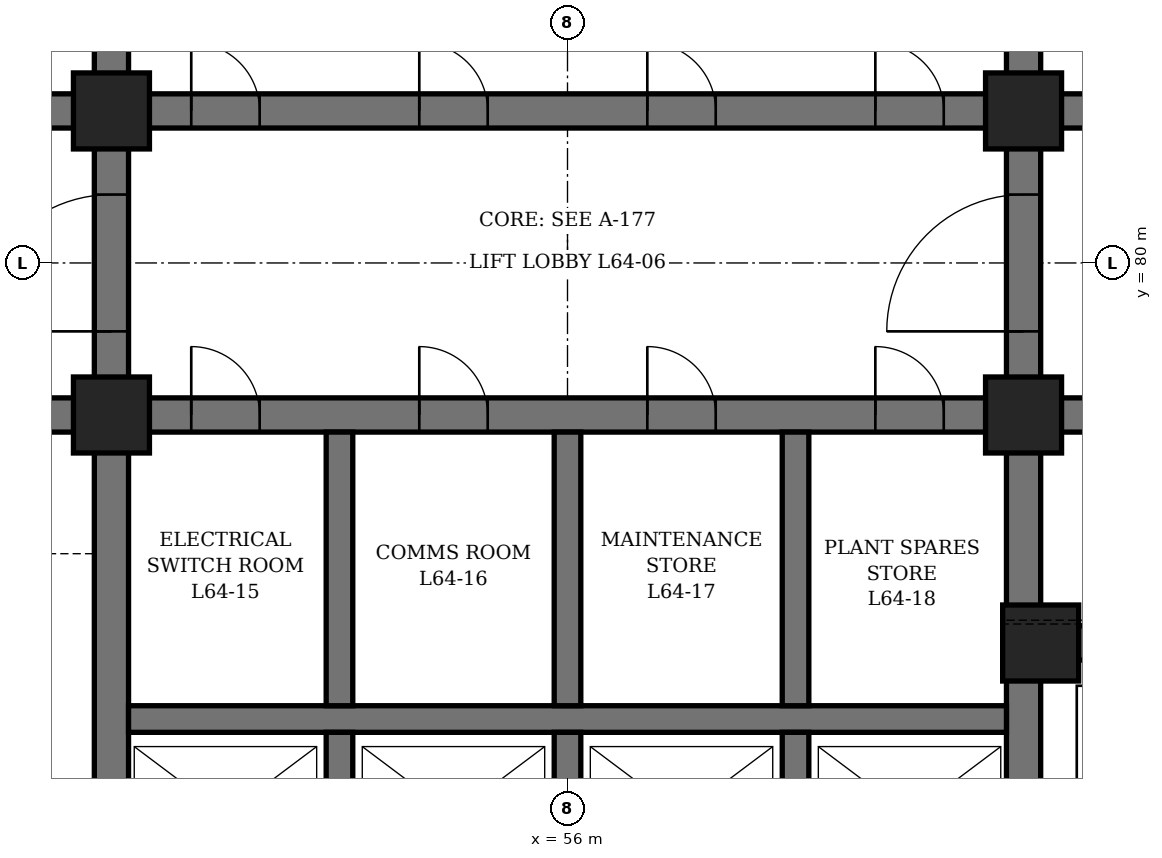
"""IFC4 building model, lengths in metres.
Left out: names, types, materials, properties, quantities, classifications, styles, units other than length and angle.
Written with IfcOpenShell. Run it as: python <this file> out.ifc"""

import sys

from ifc_helpers import new_model, si_unit, direction, frame, frame_2d, origin, origin_2d, place, context, subcontext, project, spatial, polyline, rectangle, hollow_rectangle, outline, extrude, element, fill, save


model = new_model("IFC4")
c1 = context("Model", 3, precision=1e-05, world=origin(), true_north=direction((0.0, 1.0)))
c2 = subcontext(c1, "Body", "Model", "MODEL_VIEW")
j1 = project(units=[si_unit("LENGTHUNIT", "METRE"), si_unit("PLANEANGLEUNIT", "RADIAN")], contexts=[c1])
p1 = place(None, origin())
s1 = spatial("IfcSite", under=j1, at=p1, CompositionType="ELEMENT")
p2 = place(p1, origin())
s2 = spatial("IfcBuilding", under=s1, at=p2, CompositionType="ELEMENT")
p3 = place(p2, frame((0.0, 0.0, 285.7)))
s3 = spatial("IfcBuildingStorey", under=s2, at=p3, CompositionType="ELEMENT", Elevation=285.7)
p4 = place(p3, frame((50.0, 71.6, 0.0), z_axis=(0.0, 0.0, 1.0), x_axis=(0.0, 1.0, 0.0)))
e1 = element("IfcWall", 1, at=p4, inside=s3, PredefinedType="SHEAR", context=c2, shape_type="SweptSolid", body=[
    extrude(outline(polyline([(0.0, 0.0), (16.8, 0.0), (16.8, 16.293), (0.0, 9.987), (0.0, 0.0)])), frame((0.0, 0.225, 0.0), z_axis=(0.0, -1.0, 0.0), x_axis=(1.0, 0.0, 0.0)), (0.0, 0.0, 1.0), 0.45),
])
p5 = place(p4, frame((7.5, 0.0, 0.0)))
e2 = element("IfcOpeningElement", 2, at=p5, cuts=e1, PredefinedType="OPENING", context=c2, shape_type="SweptSolid", body=[
    extrude(rectangle(XDim=1.8, YDim=2.4, at=frame_2d((0.9, 1.2))), frame((0.0, 0.235, 0.0), z_axis=(0.0, -1.0, 0.0), x_axis=(1.0, 0.0, 0.0)), (0.0, 0.0, 1.0), 0.47),
])
p6 = place(p3, frame((62.0, 71.6, 0.0), z_axis=(0.0, 0.0, 1.0), x_axis=(0.0, 1.0, 0.0)))
e3 = element("IfcWall", 3, at=p6, inside=s3, PredefinedType="SHEAR", context=c2, shape_type="SweptSolid", body=[
    extrude(outline(polyline([(0.0, 0.0), (16.8, 0.0), (16.8, 16.293), (0.0, 9.987), (0.0, 0.0)])), frame((0.0, 0.225, 0.0), z_axis=(0.0, -1.0, 0.0), x_axis=(1.0, 0.0, 0.0)), (0.0, 0.0, 1.0), 0.45),
])
p7 = place(p6, frame((7.5, 0.0, 0.0)))
e4 = element("IfcOpeningElement", 4, at=p7, cuts=e3, PredefinedType="OPENING", context=c2, shape_type="SweptSolid", body=[
    extrude(rectangle(XDim=1.8, YDim=2.4, at=frame_2d((0.9, 1.2))), frame((0.0, 0.235, 0.0), z_axis=(0.0, -1.0, 0.0), x_axis=(1.0, 0.0, 0.0)), (0.0, 0.0, 1.0), 0.47),
])
p8 = place(p3, frame((44.6, 78.0, 0.0), z_axis=(0.0, 0.0, 1.0), x_axis=(1.0, 0.0, 0.0)))
e5 = element("IfcWall", 5, at=p8, inside=s3, PredefinedType="SHEAR", context=c2, shape_type="SweptSolid", body=[
    extrude(outline(polyline([(0.0, 0.0), (5.175, 0.0), (5.175, 12.305), (0.0, 12.305), (0.0, 0.0)])), frame((0.0, 0.225, 0.0), z_axis=(0.0, -1.0, 0.0), x_axis=(1.0, 0.0, 0.0)), (0.0, 0.0, 1.0), 0.45),
])
p9 = place(p8, frame((1.8, 0.0, 0.0)))
e6 = element("IfcOpeningElement", 6, at=p9, cuts=e5, PredefinedType="OPENING", context=c2, shape_type="SweptSolid", body=[
    extrude(rectangle(XDim=1.2, YDim=2.1, at=frame_2d((0.6, 1.05))), frame((0.0, 0.235, 0.0), z_axis=(0.0, -1.0, 0.0), x_axis=(1.0, 0.0, 0.0)), (0.0, 0.0, 1.0), 0.47),
])
p10 = place(p3, frame((44.6, 82.0, 0.0), z_axis=(0.0, 0.0, 1.0), x_axis=(1.0, 0.0, 0.0)))
e7 = element("IfcWall", 7, at=p10, inside=s3, PredefinedType="SHEAR", context=c2, shape_type="SweptSolid", body=[
    extrude(outline(polyline([(0.0, 0.0), (5.175, 0.0), (5.175, 13.806), (0.0, 13.806), (0.0, 0.0)])), frame((0.0, 0.225, 0.0), z_axis=(0.0, -1.0, 0.0), x_axis=(1.0, 0.0, 0.0)), (0.0, 0.0, 1.0), 0.45),
])
p11 = place(p10, frame((0.7, 0.0, 0.0)))
e8 = element("IfcOpeningElement", 8, at=p11, cuts=e7, PredefinedType="OPENING", context=c2, shape_type="SweptSolid", body=[
    extrude(rectangle(XDim=0.9, YDim=2.1, at=frame_2d((0.45, 1.05))), frame((0.0, 0.235, 0.0), z_axis=(0.0, -1.0, 0.0), x_axis=(1.0, 0.0, 0.0)), (0.0, 0.0, 1.0), 0.47),
])
p12 = place(p3, frame((62.225, 75.0, 0.0), z_axis=(0.0, 0.0, 1.0), x_axis=(1.0, 0.0, 0.0)))
e9 = element("IfcWall", 9, at=p12, inside=s3, PredefinedType="SHEAR", context=c2, shape_type="SweptSolid", body=[
    extrude(outline(polyline([(0.0, 0.0), (5.175, 0.0), (5.175, 11.179), (0.0, 11.179), (0.0, 0.0)])), frame((0.0, 0.225, 0.0), z_axis=(0.0, -1.0, 0.0), x_axis=(1.0, 0.0, 0.0)), (0.0, 0.0, 1.0), 0.45),
])
p13 = place(p12, frame((0.675, 0.0, 0.0)))
e10 = element("IfcOpeningElement", 10, at=p13, cuts=e9, PredefinedType="OPENING", context=c2, shape_type="SweptSolid", body=[
    extrude(rectangle(XDim=1.2, YDim=2.2, at=frame_2d((0.6, 1.1))), frame((0.0, 0.235, 0.0), z_axis=(0.0, -1.0, 0.0), x_axis=(1.0, 0.0, 0.0)), (0.0, 0.0, 1.0), 0.47),
])
p14 = place(p12, frame((3.425, 0.0, 0.0)))
e11 = element("IfcOpeningElement", 11, at=p14, cuts=e9, PredefinedType="OPENING", context=c2, shape_type="SweptSolid", body=[
    extrude(rectangle(XDim=1.2, YDim=2.2, at=frame_2d((0.6, 1.1))), frame((0.0, 0.235, 0.0), z_axis=(0.0, -1.0, 0.0), x_axis=(1.0, 0.0, 0.0)), (0.0, 0.0, 1.0), 0.47),
])
p15 = place(p3, frame((62.225, 78.0, 0.0), z_axis=(0.0, 0.0, 1.0), x_axis=(1.0, 0.0, 0.0)))
e12 = element("IfcWall", 12, at=p15, inside=s3, PredefinedType="SHEAR", context=c2, shape_type="SweptSolid", body=[
    extrude(outline(polyline([(0.0, 0.0), (5.175, 0.0), (5.175, 12.305), (0.0, 12.305), (0.0, 0.0)])), frame((0.0, 0.225, 0.0), z_axis=(0.0, -1.0, 0.0), x_axis=(1.0, 0.0, 0.0)), (0.0, 0.0, 1.0), 0.45),
])
p16 = place(p15, frame((2.175, 0.0, 0.0)))
e13 = element("IfcOpeningElement", 13, at=p16, cuts=e12, PredefinedType="OPENING", context=c2, shape_type="SweptSolid", body=[
    extrude(rectangle(XDim=1.2, YDim=2.1, at=frame_2d((0.6, 1.05))), frame((0.0, 0.235, 0.0), z_axis=(0.0, -1.0, 0.0), x_axis=(1.0, 0.0, 0.0)), (0.0, 0.0, 1.0), 0.47),
])
p17 = place(p3, frame((62.225, 82.0, 0.0), z_axis=(0.0, 0.0, 1.0), x_axis=(1.0, 0.0, 0.0)))
e14 = element("IfcWall", 14, at=p17, inside=s3, PredefinedType="SHEAR", context=c2, shape_type="SweptSolid", body=[
    extrude(outline(polyline([(0.0, 0.0), (5.175, 0.0), (5.175, 13.806), (0.0, 13.806), (0.0, 0.0)])), frame((0.0, 0.225, 0.0), z_axis=(0.0, -1.0, 0.0), x_axis=(1.0, 0.0, 0.0)), (0.0, 0.0, 1.0), 0.45),
])
p18 = place(p17, frame((2.175, 0.0, 0.0)))
e15 = element("IfcOpeningElement", 15, at=p18, cuts=e14, PredefinedType="OPENING", context=c2, shape_type="SweptSolid", body=[
    extrude(rectangle(XDim=1.2, YDim=2.1, at=frame_2d((0.6, 1.05))), frame((0.0, 0.235, 0.0), z_axis=(0.0, -1.0, 0.0), x_axis=(1.0, 0.0, 0.0)), (0.0, 0.0, 1.0), 0.47),
])
p19 = place(p3, frame((50.225, 78.0, 0.0), z_axis=(0.0, 0.0, 1.0), x_axis=(1.0, 0.0, 0.0)))
e16 = element("IfcWall", 16, at=p19, inside=s3, PredefinedType="SHEAR", context=c2, shape_type="SweptSolid", body=[
    extrude(outline(polyline([(0.0, 0.0), (11.55, 0.0), (11.55, 12.305), (0.0, 12.305), (0.0, 0.0)])), frame((0.0, 0.225, 0.0), z_axis=(0.0, -1.0, 0.0), x_axis=(1.0, 0.0, 0.0)), (0.0, 0.0, 1.0), 0.45),
])
p20 = place(p19, frame((0.825, 0.0, 0.0)))
e17 = element("IfcOpeningElement", 17, at=p20, cuts=e16, PredefinedType="OPENING", context=c2, shape_type="SweptSolid", body=[
    extrude(rectangle(XDim=0.9, YDim=2.1, at=frame_2d((0.45, 1.05))), frame((0.0, 0.235, 0.0), z_axis=(0.0, -1.0, 0.0), x_axis=(1.0, 0.0, 0.0)), (0.0, 0.0, 1.0), 0.47),
])
p21 = place(p19, frame((3.825, 0.0, 0.0)))
e18 = element("IfcOpeningElement", 18, at=p21, cuts=e16, PredefinedType="OPENING", context=c2, shape_type="SweptSolid", body=[
    extrude(rectangle(XDim=0.9, YDim=2.1, at=frame_2d((0.45, 1.05))), frame((0.0, 0.235, 0.0), z_axis=(0.0, -1.0, 0.0), x_axis=(1.0, 0.0, 0.0)), (0.0, 0.0, 1.0), 0.47),
])
p22 = place(p19, frame((6.825, 0.0, 0.0)))
e19 = element("IfcOpeningElement", 19, at=p22, cuts=e16, PredefinedType="OPENING", context=c2, shape_type="SweptSolid", body=[
    extrude(rectangle(XDim=0.9, YDim=2.1, at=frame_2d((0.45, 1.05))), frame((0.0, 0.235, 0.0), z_axis=(0.0, -1.0, 0.0), x_axis=(1.0, 0.0, 0.0)), (0.0, 0.0, 1.0), 0.47),
])
p23 = place(p19, frame((9.825, 0.0, 0.0)))
e20 = element("IfcOpeningElement", 20, at=p23, cuts=e16, PredefinedType="OPENING", context=c2, shape_type="SweptSolid", body=[
    extrude(rectangle(XDim=0.9, YDim=2.1, at=frame_2d((0.45, 1.05))), frame((0.0, 0.235, 0.0), z_axis=(0.0, -1.0, 0.0), x_axis=(1.0, 0.0, 0.0)), (0.0, 0.0, 1.0), 0.47),
])
p24 = place(p3, frame((50.225, 82.0, 0.0), z_axis=(0.0, 0.0, 1.0), x_axis=(1.0, 0.0, 0.0)))
e21 = element("IfcWall", 21, at=p24, inside=s3, PredefinedType="SHEAR", context=c2, shape_type="SweptSolid", body=[
    extrude(outline(polyline([(0.0, 0.0), (11.55, 0.0), (11.55, 13.806), (0.0, 13.806), (0.0, 0.0)])), frame((0.0, 0.225, 0.0), z_axis=(0.0, -1.0, 0.0), x_axis=(1.0, 0.0, 0.0)), (0.0, 0.0, 1.0), 0.45),
])
p25 = place(p24, frame((0.825, 0.0, 0.0)))
e22 = element("IfcOpeningElement", 22, at=p25, cuts=e21, PredefinedType="OPENING", context=c2, shape_type="SweptSolid", body=[
    extrude(rectangle(XDim=0.9, YDim=2.1, at=frame_2d((0.45, 1.05))), frame((0.0, 0.235, 0.0), z_axis=(0.0, -1.0, 0.0), x_axis=(1.0, 0.0, 0.0)), (0.0, 0.0, 1.0), 0.47),
])
p26 = place(p24, frame((3.825, 0.0, 0.0)))
e23 = element("IfcOpeningElement", 23, at=p26, cuts=e21, PredefinedType="OPENING", context=c2, shape_type="SweptSolid", body=[
    extrude(rectangle(XDim=0.9, YDim=2.1, at=frame_2d((0.45, 1.05))), frame((0.0, 0.235, 0.0), z_axis=(0.0, -1.0, 0.0), x_axis=(1.0, 0.0, 0.0)), (0.0, 0.0, 1.0), 0.47),
])
p27 = place(p24, frame((6.825, 0.0, 0.0)))
e24 = element("IfcOpeningElement", 24, at=p27, cuts=e21, PredefinedType="OPENING", context=c2, shape_type="SweptSolid", body=[
    extrude(rectangle(XDim=0.9, YDim=2.1, at=frame_2d((0.45, 1.05))), frame((0.0, 0.235, 0.0), z_axis=(0.0, -1.0, 0.0), x_axis=(1.0, 0.0, 0.0)), (0.0, 0.0, 1.0), 0.47),
])
p28 = place(p24, frame((9.825, 0.0, 0.0)))
e25 = element("IfcOpeningElement", 25, at=p28, cuts=e21, PredefinedType="OPENING", context=c2, shape_type="SweptSolid", body=[
    extrude(rectangle(XDim=0.9, YDim=2.1, at=frame_2d((0.45, 1.05))), frame((0.0, 0.235, 0.0), z_axis=(0.0, -1.0, 0.0), x_axis=(1.0, 0.0, 0.0)), (0.0, 0.0, 1.0), 0.47),
])
p29 = place(p3, frame((50.225, 74.0, 0.0), z_axis=(0.0, 0.0, 1.0), x_axis=(1.0, 0.0, 0.0)))
e26 = element("IfcWall", 26, at=p29, inside=s3, PredefinedType="SHEAR", context=c2, shape_type="SweptSolid", body=[
    extrude(outline(polyline([(0.0, 0.0), (11.55, 0.0), (11.55, 10.822), (0.0, 10.822), (0.0, 0.0)])), frame((0.0, 0.175, 0.0), z_axis=(0.0, -1.0, 0.0), x_axis=(1.0, 0.0, 0.0)), (0.0, 0.0, 1.0), 0.35),
])
p30 = place(p3, frame((53.0, 71.6, 0.0), z_axis=(0.0, 0.0, 1.0), x_axis=(0.0, 1.0, 0.0)))
e27 = element("IfcWall", 27, at=p30, inside=s3, PredefinedType="SHEAR", context=c2, shape_type="SweptSolid", body=[
    extrude(outline(polyline([(0.0, 0.0), (2.225, 0.0), (2.225, 10.822), (0.0, 9.987), (0.0, 0.0)])), frame((0.0, 0.175, 0.0), z_axis=(0.0, -1.0, 0.0), x_axis=(1.0, 0.0, 0.0)), (0.0, 0.0, 1.0), 0.35),
])
p31 = place(p3, frame((53.0, 74.175, 0.0), z_axis=(0.0, 0.0, 1.0), x_axis=(0.0, 1.0, 0.0)))
e28 = element("IfcWall", 28, at=p31, inside=s3, PredefinedType="SHEAR", context=c2, shape_type="SweptSolid", body=[
    extrude(outline(polyline([(0.0, 0.0), (3.6, 0.0), (3.6, 12.305), (0.0, 10.954), (0.0, 0.0)])), frame((0.0, 0.175, 0.0), z_axis=(0.0, -1.0, 0.0), x_axis=(1.0, 0.0, 0.0)), (0.0, 0.0, 1.0), 0.35),
])
p32 = place(p3, frame((56.0, 71.6, 0.0), z_axis=(0.0, 0.0, 1.0), x_axis=(0.0, 1.0, 0.0)))
e29 = element("IfcWall", 29, at=p32, inside=s3, PredefinedType="SHEAR", context=c2, shape_type="SweptSolid", body=[
    extrude(outline(polyline([(0.0, 0.0), (2.225, 0.0), (2.225, 10.822), (0.0, 9.987), (0.0, 0.0)])), frame((0.0, 0.175, 0.0), z_axis=(0.0, -1.0, 0.0), x_axis=(1.0, 0.0, 0.0)), (0.0, 0.0, 1.0), 0.35),
])
p33 = place(p3, frame((56.0, 74.175, 0.0), z_axis=(0.0, 0.0, 1.0), x_axis=(0.0, 1.0, 0.0)))
e30 = element("IfcWall", 30, at=p33, inside=s3, PredefinedType="SHEAR", context=c2, shape_type="SweptSolid", body=[
    extrude(outline(polyline([(0.0, 0.0), (3.6, 0.0), (3.6, 12.305), (0.0, 10.954), (0.0, 0.0)])), frame((0.0, 0.175, 0.0), z_axis=(0.0, -1.0, 0.0), x_axis=(1.0, 0.0, 0.0)), (0.0, 0.0, 1.0), 0.35),
])
p34 = place(p3, frame((59.0, 71.6, 0.0), z_axis=(0.0, 0.0, 1.0), x_axis=(0.0, 1.0, 0.0)))
e31 = element("IfcWall", 31, at=p34, inside=s3, PredefinedType="SHEAR", context=c2, shape_type="SweptSolid", body=[
    extrude(outline(polyline([(0.0, 0.0), (2.225, 0.0), (2.225, 10.822), (0.0, 9.987), (0.0, 0.0)])), frame((0.0, 0.175, 0.0), z_axis=(0.0, -1.0, 0.0), x_axis=(1.0, 0.0, 0.0)), (0.0, 0.0, 1.0), 0.35),
])
p35 = place(p3, frame((59.0, 74.175, 0.0), z_axis=(0.0, 0.0, 1.0), x_axis=(0.0, 1.0, 0.0)))
e32 = element("IfcWall", 32, at=p35, inside=s3, PredefinedType="SHEAR", context=c2, shape_type="SweptSolid", body=[
    extrude(outline(polyline([(0.0, 0.0), (3.6, 0.0), (3.6, 12.305), (0.0, 10.954), (0.0, 0.0)])), frame((0.0, 0.175, 0.0), z_axis=(0.0, -1.0, 0.0), x_axis=(1.0, 0.0, 0.0)), (0.0, 0.0, 1.0), 0.35),
])
p36 = place(p3, frame((50.0, 78.0, 0.0), z_axis=(0.0, 0.0, 1.0), x_axis=(1.0, 0.0, 0.0)))
e33 = element("IfcColumn", 33, at=p36, inside=s3, PredefinedType="COLUMN", context=c2, shape_type="SweptSolid", body=[
    extrude(hollow_rectangle(XDim=1.0, YDim=1.0, WallThickness=0.15, at=origin_2d()), origin(), (0.0, 0.0, 1.0), 12.201),
])
p37 = place(p3, frame((50.0, 82.0, 0.0), z_axis=(0.0, 0.0, 1.0), x_axis=(1.0, 0.0, 0.0)))
e34 = element("IfcColumn", 34, at=p37, inside=s3, PredefinedType="COLUMN", context=c2, shape_type="SweptSolid", body=[
    extrude(hollow_rectangle(XDim=1.0, YDim=1.0, WallThickness=0.15, at=origin_2d()), origin(), (0.0, 0.0, 1.0), 13.703),
])
p38 = place(p3, frame((62.0, 78.0, 0.0), z_axis=(0.0, 0.0, 1.0), x_axis=(1.0, 0.0, 0.0)))
e35 = element("IfcColumn", 35, at=p38, inside=s3, PredefinedType="COLUMN", context=c2, shape_type="SweptSolid", body=[
    extrude(hollow_rectangle(XDim=1.0, YDim=1.0, WallThickness=0.15, at=origin_2d()), origin(), (0.0, 0.0, 1.0), 12.201),
])
p39 = place(p3, frame((62.0, 82.0, 0.0), z_axis=(0.0, 0.0, 1.0), x_axis=(1.0, 0.0, 0.0)))
e36 = element("IfcColumn", 36, at=p39, inside=s3, PredefinedType="COLUMN", context=c2, shape_type="SweptSolid", body=[
    extrude(hollow_rectangle(XDim=1.0, YDim=1.0, WallThickness=0.15, at=origin_2d()), origin(), (0.0, 0.0, 1.0), 13.703),
])
p40 = place(p3, frame((62.225, 75.0, 0.0), z_axis=(0.0, 0.0, 1.0), x_axis=(1.0, 0.0, 0.0)))
e37 = element("IfcColumn", 37, at=p40, inside=s3, PredefinedType="COLUMN", context=c2, shape_type="SweptSolid", body=[
    extrude(hollow_rectangle(XDim=1.0, YDim=1.0, WallThickness=0.15, at=origin_2d()), origin(), (0.0, 0.0, 1.0), 11.075),
])
p41 = place(p20, origin())
e38 = element("IfcDoor", 38, at=p41, inside=s3, OperationType="SINGLE_SWING_LEFT", PredefinedType="DOOR", context=c2, shape_type="SweptSolid", body=[
    extrude(rectangle(XDim=0.9, YDim=2.1, at=frame_2d((0.45, 1.05))), frame((0.0, 0.225, 0.0), z_axis=(0.0, -1.0, 0.0), x_axis=(1.0, 0.0, 0.0)), (0.0, 0.0, 1.0), 0.449),
])
fill(e17, e38)
p42 = place(p21, origin())
e39 = element("IfcDoor", 39, at=p42, inside=s3, OperationType="SINGLE_SWING_LEFT", PredefinedType="DOOR", context=c2, shape_type="SweptSolid", body=[
    extrude(rectangle(XDim=0.9, YDim=2.1, at=frame_2d((0.45, 1.05))), frame((0.0, 0.225, 0.0), z_axis=(0.0, -1.0, 0.0), x_axis=(1.0, 0.0, 0.0)), (0.0, 0.0, 1.0), 0.449),
])
fill(e18, e39)
p43 = place(p22, origin())
e40 = element("IfcDoor", 40, at=p43, inside=s3, OperationType="SINGLE_SWING_LEFT", PredefinedType="DOOR", context=c2, shape_type="SweptSolid", body=[
    extrude(rectangle(XDim=0.9, YDim=2.1, at=frame_2d((0.45, 1.05))), frame((0.0, 0.225, 0.0), z_axis=(0.0, -1.0, 0.0), x_axis=(1.0, 0.0, 0.0)), (0.0, 0.0, 1.0), 0.449),
])
fill(e19, e40)
p44 = place(p23, origin())
e41 = element("IfcDoor", 41, at=p44, inside=s3, OperationType="SINGLE_SWING_LEFT", PredefinedType="DOOR", context=c2, shape_type="SweptSolid", body=[
    extrude(rectangle(XDim=0.9, YDim=2.1, at=frame_2d((0.45, 1.05))), frame((0.0, 0.225, 0.0), z_axis=(0.0, -1.0, 0.0), x_axis=(1.0, 0.0, 0.0)), (0.0, 0.0, 1.0), 0.449),
])
fill(e20, e41)
p45 = place(p25, origin())
e42 = element("IfcDoor", 42, at=p45, inside=s3, OperationType="SINGLE_SWING_LEFT", PredefinedType="DOOR", context=c2, shape_type="SweptSolid", body=[
    extrude(rectangle(XDim=0.9, YDim=2.1, at=frame_2d((0.45, 1.05))), frame((0.0, 0.225, 0.0), z_axis=(0.0, -1.0, 0.0), x_axis=(1.0, 0.0, 0.0)), (0.0, 0.0, 1.0), 0.449),
])
fill(e22, e42)
p46 = place(p26, origin())
e43 = element("IfcDoor", 43, at=p46, inside=s3, OperationType="SINGLE_SWING_LEFT", PredefinedType="DOOR", context=c2, shape_type="SweptSolid", body=[
    extrude(rectangle(XDim=0.9, YDim=2.1, at=frame_2d((0.45, 1.05))), frame((0.0, 0.225, 0.0), z_axis=(0.0, -1.0, 0.0), x_axis=(1.0, 0.0, 0.0)), (0.0, 0.0, 1.0), 0.449),
])
fill(e23, e43)
p47 = place(p27, origin())
e44 = element("IfcDoor", 44, at=p47, inside=s3, OperationType="SINGLE_SWING_LEFT", PredefinedType="DOOR", context=c2, shape_type="SweptSolid", body=[
    extrude(rectangle(XDim=0.9, YDim=2.1, at=frame_2d((0.45, 1.05))), frame((0.0, 0.225, 0.0), z_axis=(0.0, -1.0, 0.0), x_axis=(1.0, 0.0, 0.0)), (0.0, 0.0, 1.0), 0.449),
])
fill(e24, e44)
p48 = place(p28, origin())
e45 = element("IfcDoor", 45, at=p48, inside=s3, OperationType="SINGLE_SWING_LEFT", PredefinedType="DOOR", context=c2, shape_type="SweptSolid", body=[
    extrude(rectangle(XDim=0.9, YDim=2.1, at=frame_2d((0.45, 1.05))), frame((0.0, 0.225, 0.0), z_axis=(0.0, -1.0, 0.0), x_axis=(1.0, 0.0, 0.0)), (0.0, 0.0, 1.0), 0.449),
])
fill(e25, e45)
p49 = place(p5, origin())
e46 = element("IfcDoor", 46, at=p49, inside=s3, OperationType="DOUBLE_DOOR_SINGLE_SWING", PredefinedType="DOOR", context=c2, shape_type="SweptSolid", body=[
    extrude(rectangle(XDim=1.8, YDim=2.4, at=frame_2d((0.9, 1.2))), frame((0.0, 0.225, 0.0), z_axis=(0.0, -1.0, 0.0), x_axis=(1.0, 0.0, 0.0)), (0.0, 0.0, 1.0), 0.449),
])
fill(e2, e46)
p50 = place(p7, origin())
e47 = element("IfcDoor", 47, at=p50, inside=s3, OperationType="DOUBLE_DOOR_SINGLE_SWING", PredefinedType="DOOR", context=c2, shape_type="SweptSolid", body=[
    extrude(rectangle(XDim=1.8, YDim=2.4, at=frame_2d((0.9, 1.2))), frame((0.0, 0.225, 0.0), z_axis=(0.0, -1.0, 0.0), x_axis=(1.0, 0.0, 0.0)), (0.0, 0.0, 1.0), 0.449),
])
fill(e4, e47)
save(model, sys.argv[1])
